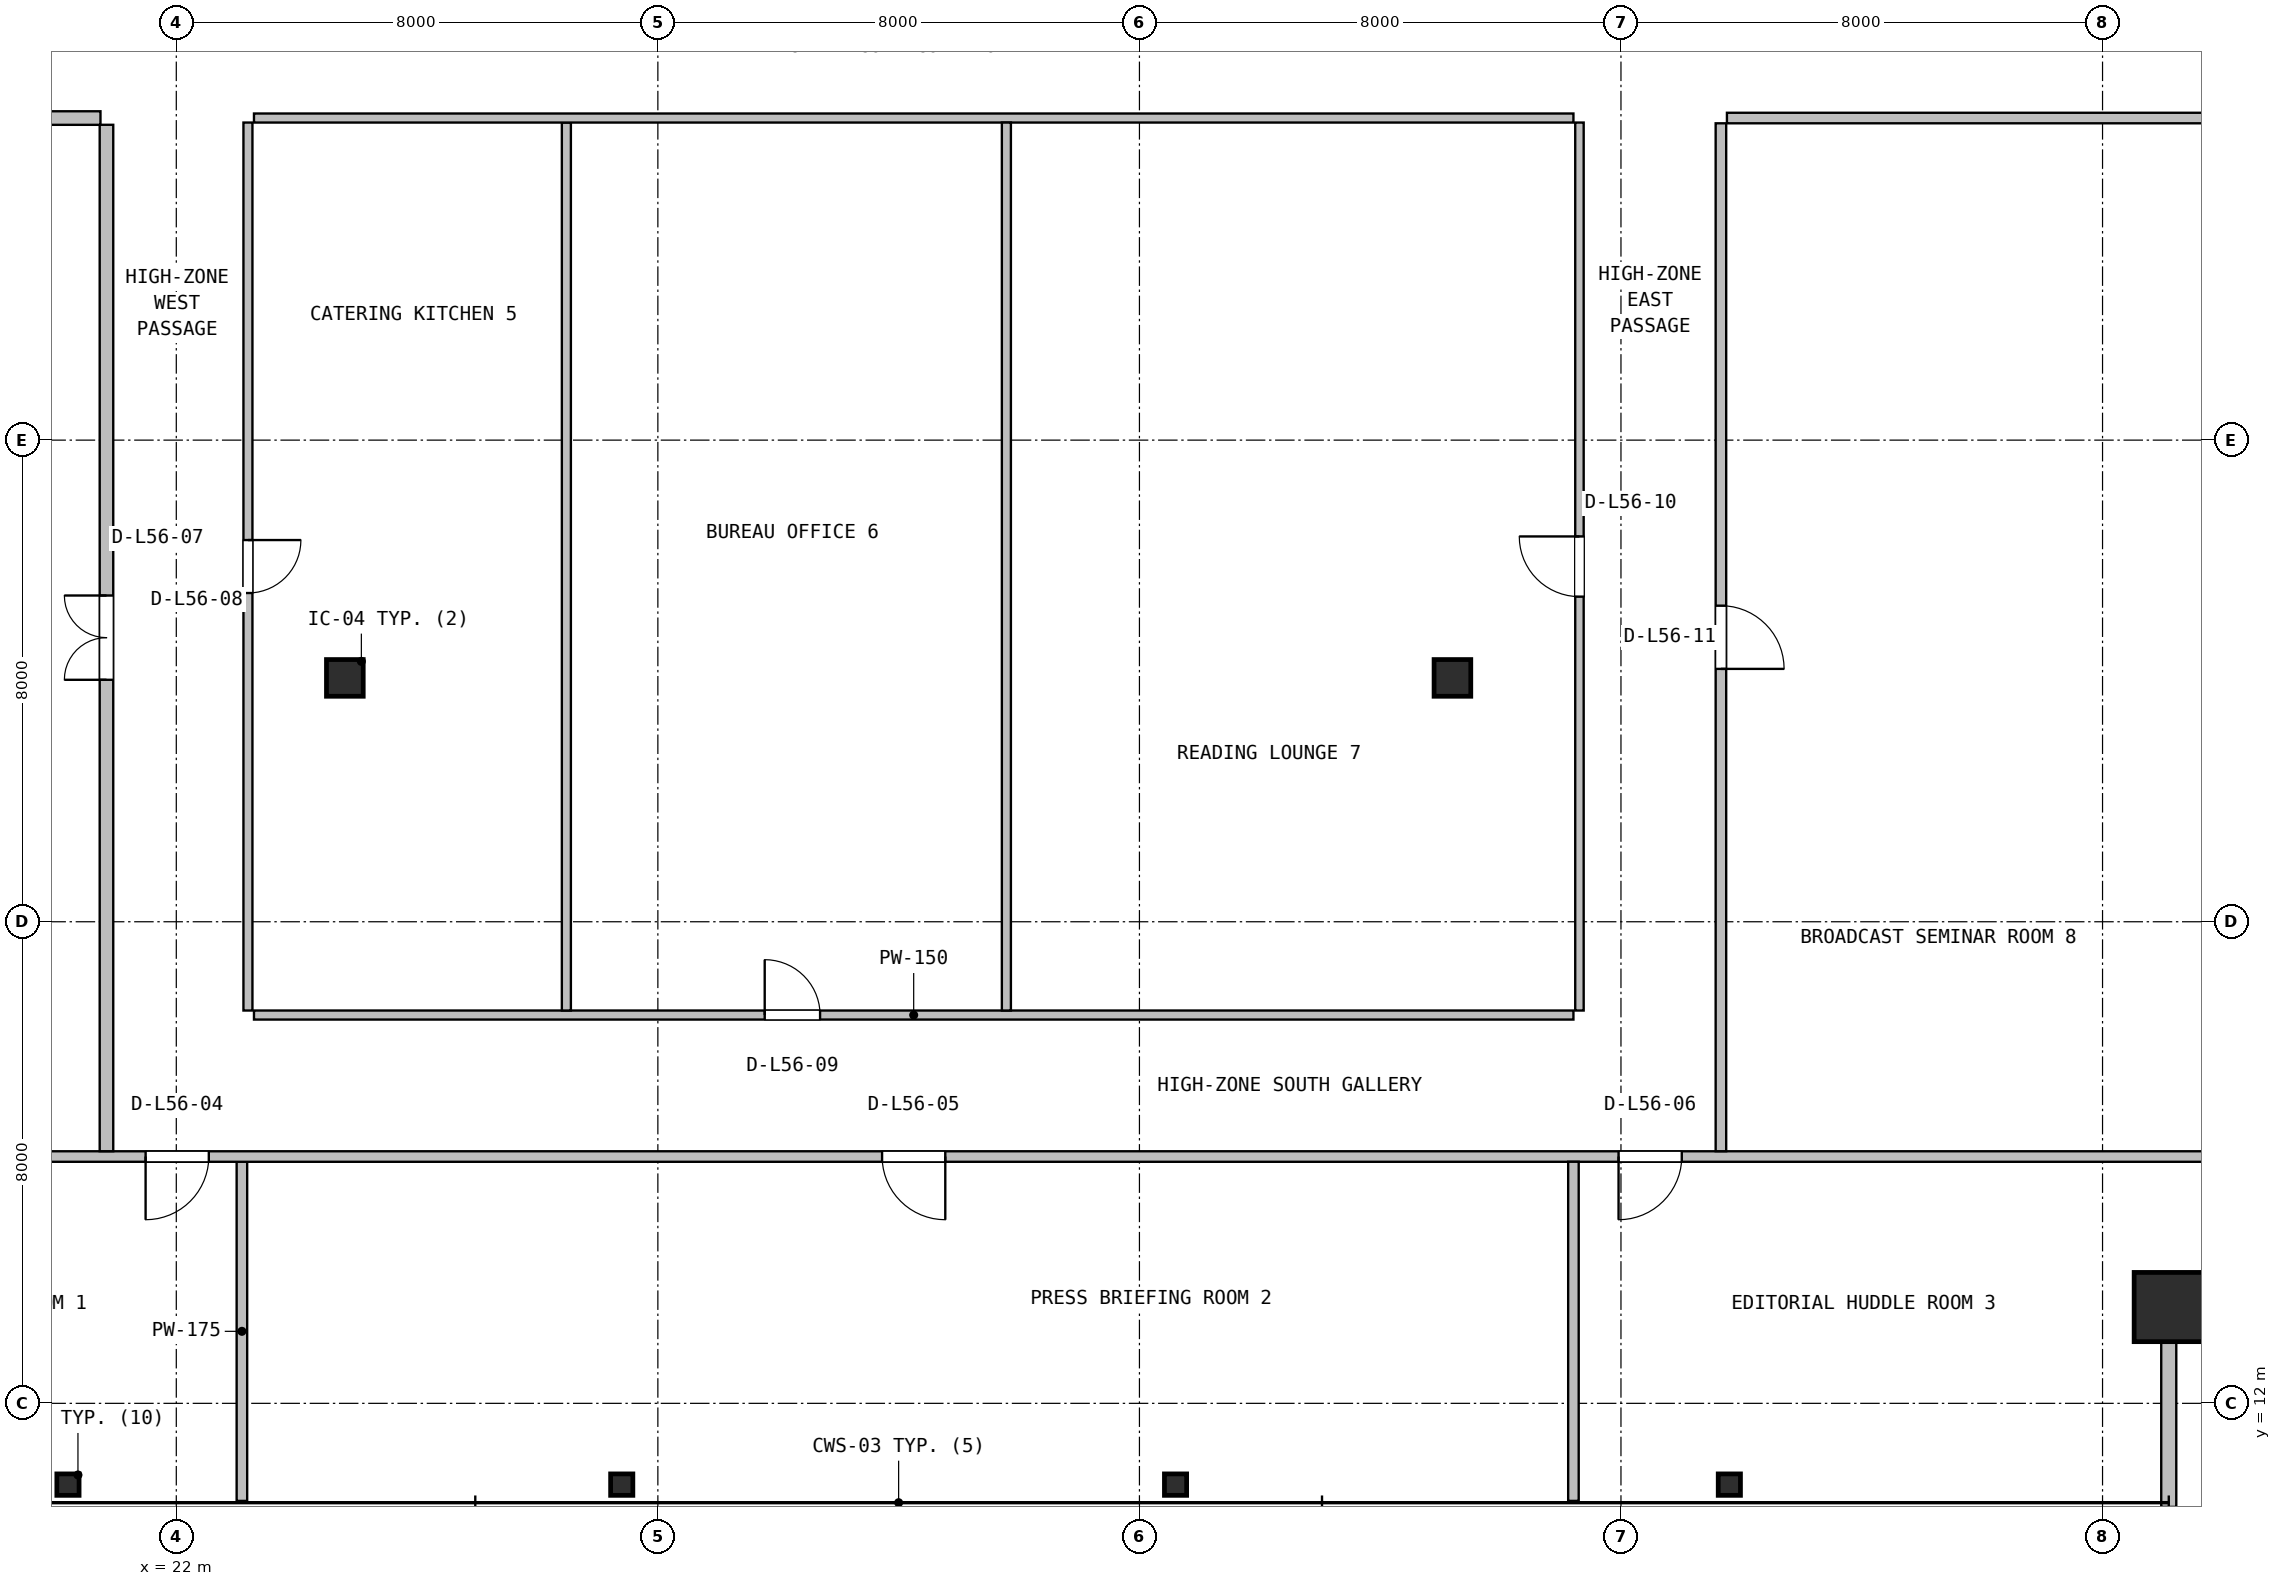
"""IFC4 building model, lengths in metres.
Left out: names, types, materials, properties, quantities, classifications, styles, units other than length and angle.
Written with IfcOpenShell. Run it as: python <this file> out.ifc"""

import sys

from ifc_helpers import new_model, si_unit, direction, frame, frame_2d, origin, origin_2d, place, context, subcontext, project, spatial, rectangle, hollow_rectangle, hollow_circle, i_section, extrude, source, transform, mapped, element, fill, save


model = new_model("IFC4")
c1 = context("Model", 3, precision=1e-05, world=origin(), true_north=direction((0.0, 1.0)))
c2 = subcontext(c1, "Body", "Model", "MODEL_VIEW")
j1 = project(units=[si_unit("LENGTHUNIT", "METRE"), si_unit("PLANEANGLEUNIT", "RADIAN")], contexts=[c1])
p1 = place(None, origin())
s1 = spatial("IfcSite", under=j1, at=p1, CompositionType="ELEMENT")
p2 = place(p1, origin())
s2 = spatial("IfcBuilding", under=s1, at=p2, CompositionType="ELEMENT")
p3 = place(p2, frame((0.0, 0.0, 226.4)))
s3 = spatial("IfcBuildingStorey", under=s2, at=p3, CompositionType="ELEMENT", Elevation=226.4)
m1 = source(origin(), c2, "Body", "SweptSolid", [
    extrude(hollow_rectangle(XDim=1.15, YDim=1.15, WallThickness=0.045, at=origin_2d()), origin(), (0.0, 0.0, 1.0), 3.8),
])
p4 = place(p3, frame((55.1, 13.6, 0.0), z_axis=(0.0, 0.0, 1.0), x_axis=(1.0, 0.0, 0.0)))
e1 = element("IfcColumn", 1, at=p4, inside=s3, PredefinedType="COLUMN", context=c2, shape_type="MappedRepresentation", body=[
    mapped(m1, transform((0.0, 0.0, 0.0), x_axis=(1.0, 0.0, 0.0), y_axis=(0.0, 1.0, 0.0), z_axis=(0.0, 0.0, 1.0), scale=1.0)),
])
m2 = source(origin(), c2, "Body", "SweptSolid", [
    extrude(i_section(OverallWidth=0.369, OverallDepth=0.356, WebThickness=0.011, FlangeThickness=0.018, FilletRadius=0.016, at=origin_2d()), origin(), (0.0, 0.0, 1.0), 3.8),
])
for number, where, z_axis, x_axis in (
    (2, (20.2, 10.65, 0.0), (0.0, 0.0, 1.0), (1.0, 0.0, 0.0)),
    (3, (29.4, 10.65, 0.0), (0.0, 0.0, 1.0), (1.0, 0.0, 0.0)),
    (4, (38.6, 10.65, 0.0), (0.0, 0.0, 1.0), (1.0, 0.0, 0.0)),
    (5, (47.8, 10.65, 0.0), (0.0, 0.0, 1.0), (1.0, 0.0, 0.0)),
):
    element("IfcColumn", number, at=place(p3, frame(where, z_axis=z_axis, x_axis=x_axis)), inside=s3, PredefinedType="COLUMN", context=c2, shape_type="MappedRepresentation", body=[
        mapped(m2, transform((0.0, 0.0, 0.0), x_axis=(1.0, 0.0, 0.0), y_axis=(0.0, 1.0, 0.0), z_axis=(0.0, 0.0, 1.0), scale=1.0)),
    ])
m3 = source(origin(), c2, "Body", "SweptSolid", [
    extrude(hollow_circle(Radius=0.305, WallThickness=0.025, at=origin_2d()), origin(), (0.0, 0.0, 1.0), 3.8),
])
for number, where, z_axis, x_axis in (
    (6, (24.8, 24.05, 0.0), (0.0, 0.0, 1.0), (1.0, 0.0, 0.0)),
    (7, (43.2, 24.05, 0.0), (0.0, 0.0, 1.0), (1.0, 0.0, 0.0)),
):
    element("IfcColumn", number, at=place(p3, frame(where, z_axis=z_axis, x_axis=x_axis)), inside=s3, PredefinedType="COLUMN", context=c2, shape_type="MappedRepresentation", body=[
        mapped(m3, transform((0.0, 0.0, 0.0), x_axis=(1.0, 0.0, 0.0), y_axis=(0.0, 1.0, 0.0), z_axis=(0.0, 0.0, 1.0), scale=1.0)),
    ])
p5 = place(p3, frame((55.1, 10.28, 0.0), z_axis=(0.0, 0.0, 1.0), x_axis=(0.0, 1.0, 0.0)))
e8 = element("IfcWall", 8, at=p5, inside=s3, PredefinedType="SOLIDWALL", context=c2, shape_type="SweptSolid", body=[
    extrude(rectangle(XDim=3.4, YDim=0.25, at=frame_2d((1.7, 0.0))), origin(), (0.0, 0.0, 1.0), 3.171),
])
p6 = place(p3, frame((23.09, 10.38, 0.0), z_axis=(0.0, 0.0, 1.0), x_axis=(0.0, 1.0, 0.0)))
e9 = element("IfcWall", 9, at=p6, inside=s3, PredefinedType="PARTITIONING", context=c2, shape_type="SweptSolid", body=[
    extrude(rectangle(XDim=5.633, YDim=0.175, at=frame_2d((2.816, 0.0))), origin(), (0.0, 0.0, 1.0), 3.171),
])
p7 = place(p3, frame((9.68, 16.1, 0.0), z_axis=(0.0, 0.0, 1.0), x_axis=(1.0, 0.0, 0.0)))
e10 = element("IfcWall", 10, at=p7, inside=s3, PredefinedType="PARTITIONING", context=c2, shape_type="SweptSolid", body=[
    extrude(rectangle(XDim=48.64, YDim=0.175, at=frame_2d((24.32, 0.0))), origin(), (0.0, 0.0, 1.0), 2.908),
])
p8 = place(p7, frame((11.81, 0.0, 0.0)))
e11 = element("IfcOpeningElement", 11, at=p8, cuts=e10, PredefinedType="OPENING", context=c2, shape_type="SweptSolid", body=[
    extrude(rectangle(XDim=1.05, YDim=2.1, at=frame_2d((0.525, 1.05))), frame((0.0, 0.098, 0.0), z_axis=(0.0, -1.0, 0.0), x_axis=(1.0, 0.0, 0.0)), (0.0, 0.0, 1.0), 0.195),
])
p9 = place(p7, frame((24.045, 0.0, 0.0)))
e12 = element("IfcOpeningElement", 12, at=p9, cuts=e10, PredefinedType="OPENING", context=c2, shape_type="SweptSolid", body=[
    extrude(rectangle(XDim=1.05, YDim=2.1, at=frame_2d((0.525, 1.05))), frame((0.0, 0.098, 0.0), z_axis=(0.0, -1.0, 0.0), x_axis=(1.0, 0.0, 0.0)), (0.0, 0.0, 1.0), 0.195),
])
p10 = place(p7, frame((36.28, 0.0, 0.0)))
e13 = element("IfcOpeningElement", 13, at=p10, cuts=e10, PredefinedType="OPENING", context=c2, shape_type="SweptSolid", body=[
    extrude(rectangle(XDim=1.05, YDim=2.1, at=frame_2d((0.525, 1.05))), frame((0.0, 0.098, 0.0), z_axis=(0.0, -1.0, 0.0), x_axis=(1.0, 0.0, 0.0)), (0.0, 0.0, 1.0), 0.195),
])
p11 = place(p3, frame((45.21, 10.38, 0.0), z_axis=(0.0, 0.0, 1.0), x_axis=(0.0, 1.0, 0.0)))
e14 = element("IfcWall", 14, at=p11, inside=s3, PredefinedType="PARTITIONING", context=c2, shape_type="SweptSolid", body=[
    extrude(rectangle(XDim=5.633, YDim=0.175, at=frame_2d((2.816, 0.0))), origin(), (0.0, 0.0, 1.0), 3.171),
])
p12 = place(p3, frame((20.84, 16.188, 0.0), z_axis=(0.0, 0.0, 1.0), x_axis=(0.0, 1.0, 0.0)))
e15 = element("IfcWall", 15, at=p12, inside=s3, PredefinedType="PARTITIONING", context=c2, shape_type="SweptSolid", body=[
    extrude(rectangle(XDim=17.05, YDim=0.225, at=frame_2d((8.525, 0.0))), origin(), (0.0, 0.0, 1.0), 3.222),
])
p13 = place(p12, frame((7.831, 0.0, 0.0)))
e16 = element("IfcOpeningElement", 16, at=p13, cuts=e15, PredefinedType="OPENING", context=c2, shape_type="SweptSolid", body=[
    extrude(rectangle(XDim=1.4, YDim=2.12, at=frame_2d((0.7, 1.06))), frame((0.0, 0.123, 0.0), z_axis=(0.0, -1.0, 0.0), x_axis=(1.0, 0.0, 0.0)), (0.0, 0.0, 1.0), 0.245),
])
p14 = place(p3, frame((9.68, 33.35, 0.0), z_axis=(0.0, 0.0, 1.0), x_axis=(1.0, 0.0, 0.0)))
e17 = element("IfcWall", 17, at=p14, inside=s3, PredefinedType="PARTITIONING", context=c2, shape_type="SweptSolid", body=[
    extrude(rectangle(XDim=11.06, YDim=0.225, at=frame_2d((5.53, 0.0))), origin(), (0.0, 0.0, 1.0), 3.171),
])
p15 = place(p3, frame((23.29, 18.45, 0.0), z_axis=(0.0, 0.0, 1.0), x_axis=(1.0, 0.0, 0.0)))
e18 = element("IfcWall", 18, at=p15, inside=s3, PredefinedType="PARTITIONING", context=c2, shape_type="SweptSolid", body=[
    extrude(rectangle(XDim=21.92, YDim=0.15, at=frame_2d((10.96, 0.0))), origin(), (0.0, 0.0, 1.0), 2.908),
])
p16 = place(p15, frame((8.485, 0.0, 0.0)))
e19 = element("IfcOpeningElement", 19, at=p16, cuts=e18, PredefinedType="OPENING", context=c2, shape_type="SweptSolid", body=[
    extrude(rectangle(XDim=0.92, YDim=2.08, at=frame_2d((0.46, 1.04))), frame((0.0, 0.085, 0.0), z_axis=(0.0, -1.0, 0.0), x_axis=(1.0, 0.0, 0.0)), (0.0, 0.0, 1.0), 0.17),
])
p17 = place(p3, frame((28.48, 18.525, 0.0), z_axis=(0.0, 0.0, 1.0), x_axis=(0.0, 1.0, 0.0)))
e20 = element("IfcWall", 20, at=p17, inside=s3, PredefinedType="PARTITIONING", context=c2, shape_type="SweptSolid", body=[
    extrude(rectangle(XDim=14.75, YDim=0.15, at=frame_2d((7.375, 0.0))), origin(), (0.0, 0.0, 1.0), 2.908),
])
p18 = place(p3, frame((23.29, 33.35, 0.0), z_axis=(0.0, 0.0, 1.0), x_axis=(1.0, 0.0, 0.0)))
e21 = element("IfcWall", 21, at=p18, inside=s3, PredefinedType="PARTITIONING", context=c2, shape_type="SweptSolid", body=[
    extrude(rectangle(XDim=21.92, YDim=0.15, at=frame_2d((10.96, 0.0))), origin(), (0.0, 0.0, 1.0), 2.908),
])
p19 = place(p3, frame((23.19, 18.525, 0.0), z_axis=(0.0, 0.0, 1.0), x_axis=(0.0, 1.0, 0.0)))
e22 = element("IfcWall", 22, at=p19, inside=s3, PredefinedType="PARTITIONING", context=c2, shape_type="SweptSolid", body=[
    extrude(rectangle(XDim=14.75, YDim=0.15, at=frame_2d((7.375, 0.0))), origin(), (0.0, 0.0, 1.0), 3.222),
])
p20 = place(p19, frame((6.935, 0.0, 0.0)))
e23 = element("IfcOpeningElement", 23, at=p20, cuts=e22, PredefinedType="OPENING", context=c2, shape_type="SweptSolid", body=[
    extrude(rectangle(XDim=0.88, YDim=2.06, at=frame_2d((0.44, 1.03))), frame((0.0, 0.085, 0.0), z_axis=(0.0, -1.0, 0.0), x_axis=(1.0, 0.0, 0.0)), (0.0, 0.0, 1.0), 0.17),
])
p21 = place(p3, frame((35.79, 18.525, 0.0), z_axis=(0.0, 0.0, 1.0), x_axis=(0.0, 1.0, 0.0)))
e24 = element("IfcWall", 24, at=p21, inside=s3, PredefinedType="PARTITIONING", context=c2, shape_type="SweptSolid", body=[
    extrude(rectangle(XDim=14.75, YDim=0.15, at=frame_2d((7.375, 0.0))), origin(), (0.0, 0.0, 1.0), 2.908),
])
p22 = place(p3, frame((45.31, 18.525, 0.0), z_axis=(0.0, 0.0, 1.0), x_axis=(0.0, 1.0, 0.0)))
e25 = element("IfcWall", 25, at=p22, inside=s3, PredefinedType="PARTITIONING", context=c2, shape_type="SweptSolid", body=[
    extrude(rectangle(XDim=14.75, YDim=0.14, at=frame_2d((7.375, 0.0))), origin(), (0.0, 0.0, 1.0), 3.222),
])
p23 = place(p22, frame((6.875, 0.0, 0.0)))
e26 = element("IfcOpeningElement", 26, at=p23, cuts=e25, PredefinedType="OPENING", context=c2, shape_type="SweptSolid", body=[
    extrude(rectangle(XDim=1.0, YDim=2.1, at=frame_2d((0.5, 1.05))), frame((0.0, 0.08, 0.0), z_axis=(0.0, -1.0, 0.0), x_axis=(1.0, 0.0, 0.0)), (0.0, 0.0, 1.0), 0.16),
])
p24 = place(p3, frame((47.76, 33.35, 0.0), z_axis=(0.0, 0.0, 1.0), x_axis=(1.0, 0.0, 0.0)))
e27 = element("IfcWall", 27, at=p24, inside=s3, PredefinedType="PARTITIONING", context=c2, shape_type="SweptSolid", body=[
    extrude(rectangle(XDim=10.56, YDim=0.175, at=frame_2d((5.28, 0.0))), origin(), (0.0, 0.0, 1.0), 3.171),
])
p25 = place(p3, frame((47.66, 16.188, 0.0), z_axis=(0.0, 0.0, 1.0), x_axis=(0.0, 1.0, 0.0)))
e28 = element("IfcWall", 28, at=p25, inside=s3, PredefinedType="PARTITIONING", context=c2, shape_type="SweptSolid", body=[
    extrude(rectangle(XDim=17.075, YDim=0.175, at=frame_2d((8.538, 0.0))), origin(), (0.0, 0.0, 1.0), 3.222),
])
p26 = place(p25, frame((8.012, 0.0, 0.0)))
e29 = element("IfcOpeningElement", 29, at=p26, cuts=e28, PredefinedType="OPENING", context=c2, shape_type="SweptSolid", body=[
    extrude(rectangle(XDim=1.05, YDim=2.1, at=frame_2d((0.525, 1.05))), frame((0.0, 0.098, 0.0), z_axis=(0.0, -1.0, 0.0), x_axis=(1.0, 0.0, 0.0)), (0.0, 0.0, 1.0), 0.195),
])
m4 = source(origin(), c2, "Body", "SweptSolid", [
    extrude(rectangle(XDim=1.05, YDim=2.1, at=frame_2d((0.525, 1.05))), frame((0.0, 0.025, 0.0), z_axis=(0.0, -1.0, 0.0), x_axis=(1.0, 0.0, 0.0)), (0.0, 0.0, 1.0), 0.05),
])
p27 = place(p8, frame((1.05, 0.0, 0.0), z_axis=(0.0, 0.0, 1.0), x_axis=(-1.0, 0.0, 0.0)))
e30 = element("IfcDoor", 30, at=p27, inside=s3, OperationType="SINGLE_SWING_LEFT", PredefinedType="DOOR", context=c2, shape_type="MappedRepresentation", body=[
    mapped(m4, transform((0.0, 0.0, 0.0), x_axis=(1.0, 0.0, 0.0), y_axis=(0.0, 1.0, 0.0), z_axis=(0.0, 0.0, 1.0), scale=1.0)),
])
fill(e11, e30)
p28 = place(p9, frame((1.05, 0.0, 0.0), z_axis=(0.0, 0.0, 1.0), x_axis=(-1.0, 0.0, 0.0)))
e31 = element("IfcDoor", 31, at=p28, inside=s3, OperationType="SINGLE_SWING_RIGHT", PredefinedType="DOOR", context=c2, shape_type="MappedRepresentation", body=[
    mapped(m4, transform((0.0, 0.0, 0.0), x_axis=(1.0, 0.0, 0.0), y_axis=(0.0, 1.0, 0.0), z_axis=(0.0, 0.0, 1.0), scale=1.0)),
])
fill(e12, e31)
p29 = place(p10, frame((1.05, 0.0, 0.0), z_axis=(0.0, 0.0, 1.0), x_axis=(-1.0, 0.0, 0.0)))
e32 = element("IfcDoor", 32, at=p29, inside=s3, OperationType="SINGLE_SWING_LEFT", PredefinedType="DOOR", context=c2, shape_type="MappedRepresentation", body=[
    mapped(m4, transform((0.0, 0.0, 0.0), x_axis=(1.0, 0.0, 0.0), y_axis=(0.0, 1.0, 0.0), z_axis=(0.0, 0.0, 1.0), scale=1.0)),
])
fill(e13, e32)
m5 = source(origin(), c2, "Body", "SweptSolid", [
    extrude(rectangle(XDim=1.4, YDim=2.12, at=frame_2d((0.7, 1.06))), frame((0.0, 0.025, 0.0), z_axis=(0.0, -1.0, 0.0), x_axis=(1.0, 0.0, 0.0)), (0.0, 0.0, 1.0), 0.05),
])
p30 = place(p13, origin())
e33 = element("IfcDoor", 33, at=p30, inside=s3, OperationType="DOUBLE_DOOR_SINGLE_SWING", PredefinedType="DOOR", context=c2, shape_type="MappedRepresentation", body=[
    mapped(m5, transform((0.0, 0.0, 0.0), x_axis=(1.0, 0.0, 0.0), y_axis=(0.0, 1.0, 0.0), z_axis=(0.0, 0.0, 1.0), scale=1.0)),
])
fill(e16, e33)
m6 = source(origin(), c2, "Body", "SweptSolid", [
    extrude(rectangle(XDim=0.88, YDim=2.06, at=frame_2d((0.44, 1.03))), frame((0.0, 0.025, 0.0), z_axis=(0.0, -1.0, 0.0), x_axis=(1.0, 0.0, 0.0)), (0.0, 0.0, 1.0), 0.05),
])
p31 = place(p20, frame((0.88, 0.0, 0.0), z_axis=(0.0, 0.0, 1.0), x_axis=(-1.0, 0.0, 0.0)))
e34 = element("IfcDoor", 34, at=p31, inside=s3, OperationType="SINGLE_SWING_RIGHT", PredefinedType="DOOR", context=c2, shape_type="MappedRepresentation", body=[
    mapped(m6, transform((0.0, 0.0, 0.0), x_axis=(1.0, 0.0, 0.0), y_axis=(0.0, 1.0, 0.0), z_axis=(0.0, 0.0, 1.0), scale=1.0)),
])
fill(e23, e34)
m7 = source(origin(), c2, "Body", "SweptSolid", [
    extrude(rectangle(XDim=0.92, YDim=2.08, at=frame_2d((0.46, 1.04))), frame((0.0, 0.025, 0.0), z_axis=(0.0, -1.0, 0.0), x_axis=(1.0, 0.0, 0.0)), (0.0, 0.0, 1.0), 0.05),
])
p32 = place(p16, origin())
e35 = element("IfcDoor", 35, at=p32, inside=s3, OperationType="SINGLE_SWING_LEFT", PredefinedType="DOOR", context=c2, shape_type="MappedRepresentation", body=[
    mapped(m7, transform((0.0, 0.0, 0.0), x_axis=(1.0, 0.0, 0.0), y_axis=(0.0, 1.0, 0.0), z_axis=(0.0, 0.0, 1.0), scale=1.0)),
])
fill(e19, e35)
m8 = source(origin(), c2, "Body", "SweptSolid", [
    extrude(rectangle(XDim=1.0, YDim=2.1, at=frame_2d((0.5, 1.05))), frame((0.0, 0.025, 0.0), z_axis=(0.0, -1.0, 0.0), x_axis=(1.0, 0.0, 0.0)), (0.0, 0.0, 1.0), 0.05),
])
p33 = place(p23, origin())
e36 = element("IfcDoor", 36, at=p33, inside=s3, OperationType="SINGLE_SWING_RIGHT", PredefinedType="DOOR", context=c2, shape_type="MappedRepresentation", body=[
    mapped(m8, transform((0.0, 0.0, 0.0), x_axis=(1.0, 0.0, 0.0), y_axis=(0.0, 1.0, 0.0), z_axis=(0.0, 0.0, 1.0), scale=1.0)),
])
fill(e26, e36)
p34 = place(p26, frame((1.05, 0.0, 0.0), z_axis=(0.0, 0.0, 1.0), x_axis=(-1.0, 0.0, 0.0)))
e37 = element("IfcDoor", 37, at=p34, inside=s3, OperationType="SINGLE_SWING_LEFT", PredefinedType="DOOR", context=c2, shape_type="MappedRepresentation", body=[
    mapped(m4, transform((0.0, 0.0, 0.0), x_axis=(1.0, 0.0, 0.0), y_axis=(0.0, 1.0, 0.0), z_axis=(0.0, 0.0, 1.0), scale=1.0)),
])
fill(e29, e37)
save(model, sys.argv[1])
